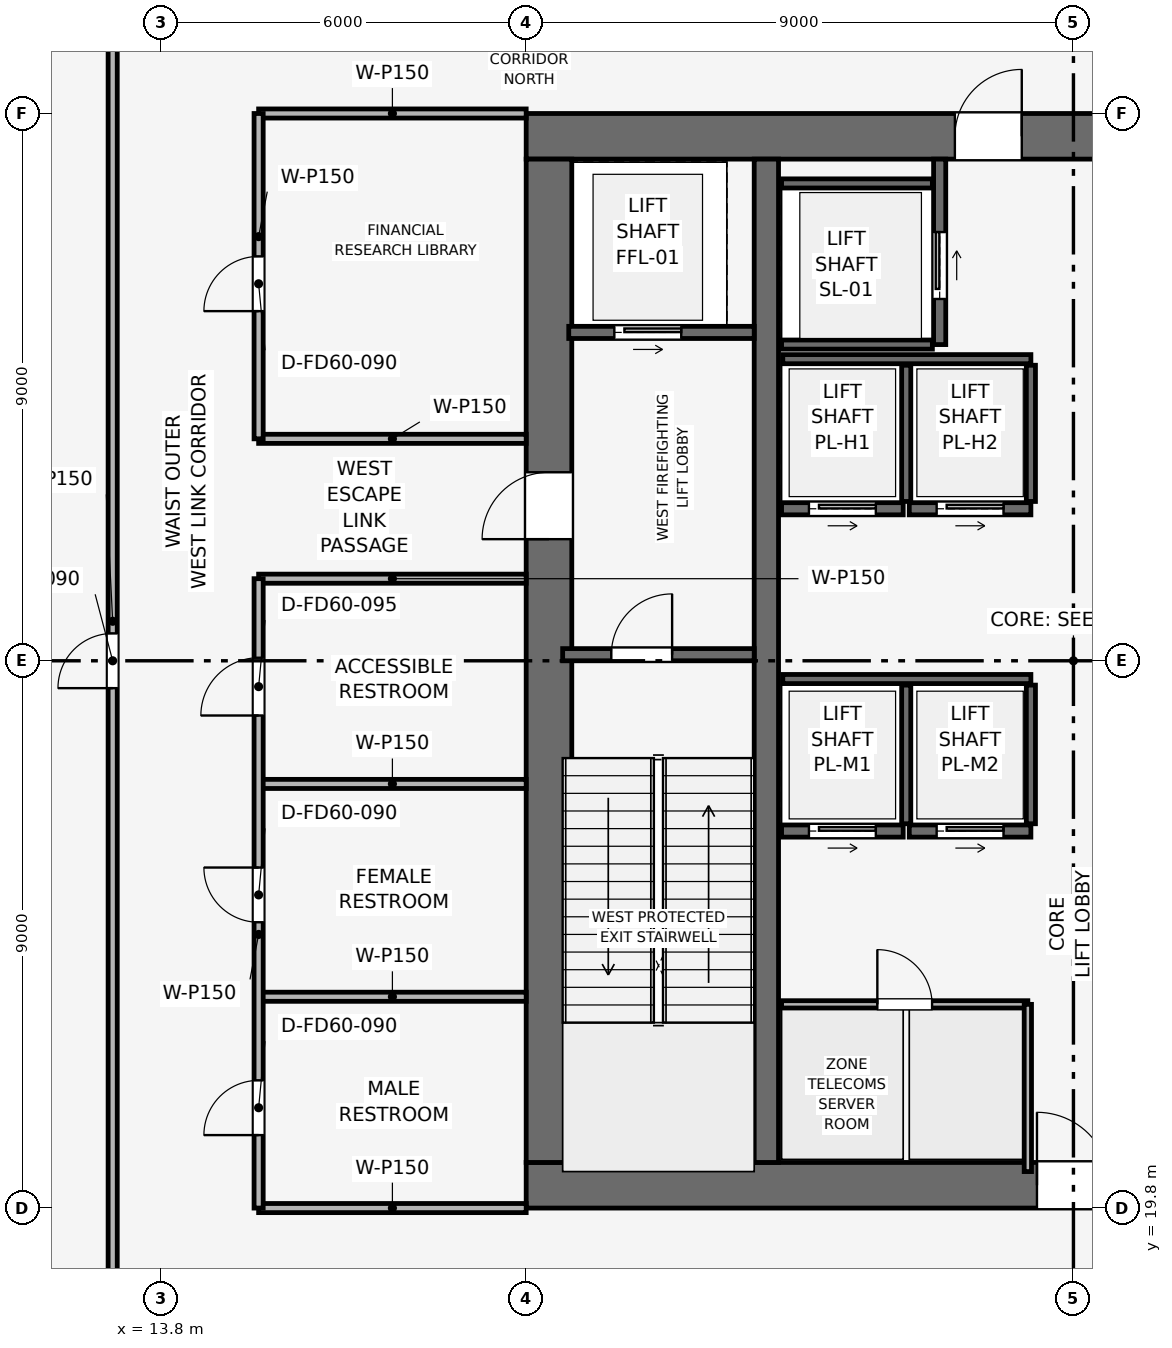
"""IFC4 building model, lengths in metres.
Left out: names, types, materials, properties, quantities, classifications, styles, units other than length and angle.
Written with IfcOpenShell. Run it as: python <this file> out.ifc"""

import sys

from ifc_helpers import new_model, si_unit, direction, frame, frame_2d, origin, place, context, subcontext, project, spatial, rectangle, extrude, element, fill, save


model = new_model("IFC4")
c1 = context("Model", 3, precision=1e-05, world=origin(), true_north=direction((0.0, 1.0)))
c2 = subcontext(c1, "Body", "Model", "MODEL_VIEW")
j1 = project(units=[si_unit("LENGTHUNIT", "METRE"), si_unit("PLANEANGLEUNIT", "RADIAN")], contexts=[c1])
p1 = place(None, origin())
s1 = spatial("IfcSite", under=j1, at=p1, CompositionType="ELEMENT")
p2 = place(p1, origin())
s2 = spatial("IfcBuilding", under=s1, at=p2, CompositionType="ELEMENT")
p3 = place(p2, frame((0.0, 0.0, 241.2)))
s3 = spatial("IfcBuildingStorey", under=s2, at=p3, CompositionType="ELEMENT", Elevation=241.2)
p4 = place(p3, frame((19.8, 20.175, 0.0), z_axis=(0.0, 0.0, 1.0), x_axis=(1.0, 0.0, 0.0)))
e1 = element("IfcWall", 1, at=p4, inside=s3, PredefinedType="SHEAR", context=c2, shape_type="SweptSolid", body=[
    extrude(rectangle(XDim=18.0, YDim=0.75, at=frame_2d((9.0, 0.0))), origin(), (0.0, 0.0, 1.0), 5.4),
])
p5 = place(p4, frame((8.4, 0.0, 0.0)))
e2 = element("IfcOpeningElement", 2, at=p5, cuts=e1, PredefinedType="OPENING", context=c2, shape_type="SweptSolid", body=[
    extrude(rectangle(XDim=1.2, YDim=2.2, at=frame_2d((0.6, 1.1))), frame((0.0, 0.385, 0.0), z_axis=(0.0, -1.0, 0.0), x_axis=(1.0, 0.0, 0.0)), (0.0, 0.0, 1.0), 0.77),
])
p6 = place(p3, frame((19.8, 37.425, 0.0), z_axis=(0.0, 0.0, 1.0), x_axis=(1.0, 0.0, 0.0)))
e3 = element("IfcWall", 3, at=p6, inside=s3, PredefinedType="SHEAR", context=c2, shape_type="SweptSolid", body=[
    extrude(rectangle(XDim=18.0, YDim=0.75, at=frame_2d((9.0, 0.0))), origin(), (0.0, 0.0, 1.0), 5.4),
])
p7 = place(p6, frame((7.05, 0.0, 0.0)))
e4 = element("IfcOpeningElement", 4, at=p7, cuts=e3, PredefinedType="OPENING", context=c2, shape_type="SweptSolid", body=[
    extrude(rectangle(XDim=1.1, YDim=2.15, at=frame_2d((0.55, 1.075))), frame((0.0, 0.385, 0.0), z_axis=(0.0, -1.0, 0.0), x_axis=(1.0, 0.0, 0.0)), (0.0, 0.0, 1.0), 0.77),
])
p8 = place(p3, frame((20.175, 20.55, 0.0), z_axis=(0.0, 0.0, 1.0), x_axis=(0.0, 1.0, 0.0)))
e5 = element("IfcWall", 5, at=p8, inside=s3, PredefinedType="SHEAR", context=c2, shape_type="SweptSolid", body=[
    extrude(rectangle(XDim=16.5, YDim=0.75, at=frame_2d((8.25, 0.0))), origin(), (0.0, 0.0, 1.0), 5.4),
])
p9 = place(p8, frame((10.25, 0.0, 0.0)))
e6 = element("IfcOpeningElement", 6, at=p9, cuts=e5, PredefinedType="OPENING", context=c2, shape_type="SweptSolid", body=[
    extrude(rectangle(XDim=1.1, YDim=2.15, at=frame_2d((0.55, 1.075))), frame((0.0, 0.385, 0.0), z_axis=(0.0, -1.0, 0.0), x_axis=(1.0, 0.0, 0.0)), (0.0, 0.0, 1.0), 0.77),
])
p10 = place(p3, frame((23.75, 20.55, 0.0), z_axis=(0.0, 0.0, 1.0), x_axis=(0.0, 1.0, 0.0)))
e7 = element("IfcWall", 7, at=p10, inside=s3, PredefinedType="SHEAR", context=c2, shape_type="SweptSolid", body=[
    extrude(rectangle(XDim=16.5, YDim=0.4, at=frame_2d((8.25, 0.0))), origin(), (0.0, 0.0, 1.0), 5.4),
])
p11 = place(p3, frame((20.4, 28.9, 0.0), z_axis=(0.0, 0.0, 1.0), x_axis=(1.0, 0.0, 0.0)))
e8 = element("IfcWall", 8, at=p11, inside=s3, PredefinedType="SHEAR", context=c2, shape_type="SweptSolid", body=[
    extrude(rectangle(XDim=3.15, YDim=0.2, at=frame_2d((1.575, 0.0))), origin(), (0.0, 0.0, 1.0), 5.15),
])
p12 = place(p11, frame((0.8, 0.0, 0.0)))
e9 = element("IfcOpeningElement", 9, at=p12, cuts=e8, PredefinedType="OPENING", context=c2, shape_type="SweptSolid", body=[
    extrude(rectangle(XDim=1.0, YDim=2.1, at=frame_2d((0.5, 1.05))), frame((0.0, 0.11, 0.0), z_axis=(0.0, -1.0, 0.0), x_axis=(1.0, 0.0, 0.0)), (0.0, 0.0, 1.0), 0.22),
])
p13 = place(p3, frame((20.5, 34.2, 0.0), z_axis=(0.0, 0.0, 1.0), x_axis=(1.0, 0.0, 0.0)))
e10 = element("IfcWall", 10, at=p13, inside=s3, PredefinedType="SHEAR", context=c2, shape_type="SweptSolid", body=[
    extrude(rectangle(XDim=3.05, YDim=0.2, at=frame_2d((1.525, 0.0))), origin(), (0.0, 0.0, 1.0), 5.15),
])
p14 = place(p13, frame((0.75, 0.0, 0.0)))
e11 = element("IfcOpeningElement", 11, at=p14, cuts=e10, PredefinedType="OPENING", context=c2, shape_type="SweptSolid", body=[
    extrude(rectangle(XDim=1.1, YDim=2.15, at=frame_2d((0.55, 1.075))), frame((0.0, 0.11, 0.0), z_axis=(0.0, -1.0, 0.0), x_axis=(1.0, 0.0, 0.0)), (0.0, 0.0, 1.0), 0.22),
])
p15 = place(p3, frame((26.6, 34.0, 0.0), z_axis=(0.0, 0.0, 1.0), x_axis=(0.0, 1.0, 0.0)))
e12 = element("IfcWall", 12, at=p15, inside=s3, PredefinedType="SHEAR", context=c2, shape_type="SweptSolid", body=[
    extrude(rectangle(XDim=3.05, YDim=0.2, at=frame_2d((1.525, 0.0))), origin(), (0.0, 0.0, 1.0), 5.15),
])
p16 = place(p15, frame((0.75, 0.0, 0.0)))
e13 = element("IfcOpeningElement", 13, at=p16, cuts=e12, PredefinedType="OPENING", context=c2, shape_type="SweptSolid", body=[
    extrude(rectangle(XDim=1.1, YDim=2.15, at=frame_2d((0.55, 1.075))), frame((0.0, 0.11, 0.0), z_axis=(0.0, -1.0, 0.0), x_axis=(1.0, 0.0, 0.0)), (0.0, 0.0, 1.0), 0.22),
])
for number, where, z_axis, x_axis in (
    (14, (24.0, 34.0, 0.0), (0.0, 0.0, 1.0), (1.0, 0.0, 0.0)),
    (15, (24.0, 36.65, 0.0), (0.0, 0.0, 1.0), (1.0, 0.0, 0.0)),
):
    element("IfcWall", number, at=place(p3, frame(where, z_axis=z_axis, x_axis=x_axis)), inside=s3, PredefinedType="SHEAR", context=c2, shape_type="SweptSolid", body=[
        extrude(rectangle(XDim=2.48, YDim=0.15, at=frame_2d((1.24, 0.0))), origin(), (0.0, 0.0, 1.0), 5.15),
    ])
p17 = place(p3, frame((24.0, 26.0, 0.0), z_axis=(0.0, 0.0, 1.0), x_axis=(1.0, 0.0, 0.0)))
e16 = element("IfcWall", 16, at=p17, inside=s3, PredefinedType="SHEAR", context=c2, shape_type="SweptSolid", body=[
    extrude(rectangle(XDim=2.0, YDim=0.2, at=frame_2d((1.0, 0.0))), origin(), (0.0, 0.0, 1.0), 5.15),
])
p18 = place(p17, frame((0.45, 0.0, 0.0)))
e17 = element("IfcOpeningElement", 17, at=p18, cuts=e16, PredefinedType="OPENING", context=c2, shape_type="SweptSolid", body=[
    extrude(rectangle(XDim=1.1, YDim=2.15, at=frame_2d((0.55, 1.075))), frame((0.0, 0.11, 0.0), z_axis=(0.0, -1.0, 0.0), x_axis=(1.0, 0.0, 0.0)), (0.0, 0.0, 1.0), 0.22),
])
p19 = place(p3, frame((26.1, 26.0, 0.0), z_axis=(0.0, 0.0, 1.0), x_axis=(1.0, 0.0, 0.0)))
e18 = element("IfcWall", 18, at=p19, inside=s3, PredefinedType="SHEAR", context=c2, shape_type="SweptSolid", body=[
    extrude(rectangle(XDim=2.0, YDim=0.2, at=frame_2d((1.0, 0.0))), origin(), (0.0, 0.0, 1.0), 5.15),
])
p20 = place(p19, frame((0.45, 0.0, 0.0)))
e19 = element("IfcOpeningElement", 19, at=p20, cuts=e18, PredefinedType="OPENING", context=c2, shape_type="SweptSolid", body=[
    extrude(rectangle(XDim=1.1, YDim=2.15, at=frame_2d((0.55, 1.075))), frame((0.0, 0.11, 0.0), z_axis=(0.0, -1.0, 0.0), x_axis=(1.0, 0.0, 0.0)), (0.0, 0.0, 1.0), 0.22),
])
p21 = place(p3, frame((24.0, 31.3, 0.0), z_axis=(0.0, 0.0, 1.0), x_axis=(1.0, 0.0, 0.0)))
e20 = element("IfcWall", 20, at=p21, inside=s3, PredefinedType="SHEAR", context=c2, shape_type="SweptSolid", body=[
    extrude(rectangle(XDim=2.0, YDim=0.2, at=frame_2d((1.0, 0.0))), origin(), (0.0, 0.0, 1.0), 5.15),
])
p22 = place(p21, frame((0.45, 0.0, 0.0)))
e21 = element("IfcOpeningElement", 21, at=p22, cuts=e20, PredefinedType="OPENING", context=c2, shape_type="SweptSolid", body=[
    extrude(rectangle(XDim=1.1, YDim=2.15, at=frame_2d((0.55, 1.075))), frame((0.0, 0.11, 0.0), z_axis=(0.0, -1.0, 0.0), x_axis=(1.0, 0.0, 0.0)), (0.0, 0.0, 1.0), 0.22),
])
p23 = place(p3, frame((26.1, 31.3, 0.0), z_axis=(0.0, 0.0, 1.0), x_axis=(1.0, 0.0, 0.0)))
e22 = element("IfcWall", 22, at=p23, inside=s3, PredefinedType="SHEAR", context=c2, shape_type="SweptSolid", body=[
    extrude(rectangle(XDim=2.0, YDim=0.2, at=frame_2d((1.0, 0.0))), origin(), (0.0, 0.0, 1.0), 5.15),
])
p24 = place(p23, frame((0.45, 0.0, 0.0)))
e23 = element("IfcOpeningElement", 23, at=p24, cuts=e22, PredefinedType="OPENING", context=c2, shape_type="SweptSolid", body=[
    extrude(rectangle(XDim=1.1, YDim=2.15, at=frame_2d((0.55, 1.075))), frame((0.0, 0.11, 0.0), z_axis=(0.0, -1.0, 0.0), x_axis=(1.0, 0.0, 0.0)), (0.0, 0.0, 1.0), 0.22),
])
p25 = place(p3, frame((24.02, 28.5, 0.0), z_axis=(0.0, 0.0, 1.0), x_axis=(1.0, 0.0, 0.0)))
e24 = element("IfcWall", 24, at=p25, inside=s3, PredefinedType="SHEAR", context=c2, shape_type="SweptSolid", body=[
    extrude(rectangle(XDim=4.08, YDim=0.15, at=frame_2d((2.04, 0.0))), origin(), (0.0, 0.0, 1.0), 5.15),
])
for number, where, z_axis, x_axis in (
    (25, (26.05, 26.12, 0.0), (0.0, 0.0, 1.0), (0.0, 1.0, 0.0)),
    (26, (28.1, 26.12, 0.0), (0.0, 0.0, 1.0), (0.0, 1.0, 0.0)),
):
    element("IfcWall", number, at=place(p3, frame(where, z_axis=z_axis, x_axis=x_axis)), inside=s3, PredefinedType="SHEAR", context=c2, shape_type="SweptSolid", body=[
        extrude(rectangle(XDim=2.28, YDim=0.15, at=frame_2d((1.14, 0.0))), origin(), (0.0, 0.0, 1.0), 5.15),
    ])
p26 = place(p3, frame((24.02, 33.76, 0.0), z_axis=(0.0, 0.0, 1.0), x_axis=(1.0, 0.0, 0.0)))
e27 = element("IfcWall", 27, at=p26, inside=s3, PredefinedType="SHEAR", context=c2, shape_type="SweptSolid", body=[
    extrude(rectangle(XDim=4.08, YDim=0.15, at=frame_2d((2.04, 0.0))), origin(), (0.0, 0.0, 1.0), 5.15),
])
for number, where, z_axis, x_axis in (
    (28, (26.05, 31.42, 0.0), (0.0, 0.0, 1.0), (0.0, 1.0, 0.0)),
    (29, (28.1, 31.42, 0.0), (0.0, 0.0, 1.0), (0.0, 1.0, 0.0)),
):
    element("IfcWall", number, at=place(p3, frame(where, z_axis=z_axis, x_axis=x_axis)), inside=s3, PredefinedType="SHEAR", context=c2, shape_type="SweptSolid", body=[
        extrude(rectangle(XDim=2.24, YDim=0.15, at=frame_2d((1.12, 0.0))), origin(), (0.0, 0.0, 1.0), 5.15),
    ])
p27 = place(p3, frame((24.0, 23.15, 0.0), z_axis=(0.0, 0.0, 1.0), x_axis=(1.0, 0.0, 0.0)))
e30 = element("IfcWall", 30, at=p27, inside=s3, PredefinedType="PARTITIONING", context=c2, shape_type="SweptSolid", body=[
    extrude(rectangle(XDim=4.05, YDim=0.12, at=frame_2d((2.025, 0.0))), origin(), (0.0, 0.0, 1.0), 5.15),
])
p28 = place(p27, frame((1.575, 0.0, 0.0)))
e31 = element("IfcOpeningElement", 31, at=p28, cuts=e30, PredefinedType="OPENING", context=c2, shape_type="SweptSolid", body=[
    extrude(rectangle(XDim=0.9, YDim=2.1, at=frame_2d((0.45, 1.05))), frame((0.0, 0.07, 0.0), z_axis=(0.0, -1.0, 0.0), x_axis=(1.0, 0.0, 0.0)), (0.0, 0.0, 1.0), 0.14),
])
p29 = place(p3, frame((28.05, 20.4, 0.0), z_axis=(0.0, 0.0, 1.0), x_axis=(0.0, 1.0, 0.0)))
e32 = element("IfcWall", 32, at=p29, inside=s3, PredefinedType="PARTITIONING", context=c2, shape_type="SweptSolid", body=[
    extrude(rectangle(XDim=2.75, YDim=0.12, at=frame_2d((1.375, 0.0))), origin(), (0.0, 0.0, 1.0), 5.15),
])
p30 = place(p3, frame((15.4, 19.8, 0.0), z_axis=(0.0, 0.0, 1.0), x_axis=(1.0, 0.0, 0.0)))
e33 = element("IfcWall", 33, at=p30, inside=s3, PredefinedType="PARTITIONING", context=c2, shape_type="SweptSolid", body=[
    extrude(rectangle(XDim=4.4, YDim=0.15, at=frame_2d((2.2, 0.0))), origin(), (0.0, 0.0, 1.0), 4.735),
])
for number, where, z_axis, x_axis in (
    (34, (15.4, 23.275, 0.0), (0.0, 0.0, 1.0), (1.0, 0.0, 0.0)),
    (35, (15.4, 26.775, 0.0), (0.0, 0.0, 1.0), (1.0, 0.0, 0.0)),
    (36, (15.4, 30.15, 0.0), (0.0, 0.0, 1.0), (1.0, 0.0, 0.0)),
    (37, (15.4, 32.45, 0.0), (0.0, 0.0, 1.0), (1.0, 0.0, 0.0)),
):
    element("IfcWall", number, at=place(p3, frame(where, z_axis=z_axis, x_axis=x_axis)), inside=s3, PredefinedType="PARTITIONING", context=c2, shape_type="SweptSolid", body=[
        extrude(rectangle(XDim=4.4, YDim=0.15, at=frame_2d((2.2, 0.0))), origin(), (0.0, 0.0, 1.0), 5.15),
    ])
p31 = place(p3, frame((15.4, 37.8, 0.0), z_axis=(0.0, 0.0, 1.0), x_axis=(1.0, 0.0, 0.0)))
e38 = element("IfcWall", 38, at=p31, inside=s3, PredefinedType="PARTITIONING", context=c2, shape_type="SweptSolid", body=[
    extrude(rectangle(XDim=4.4, YDim=0.15, at=frame_2d((2.2, 0.0))), origin(), (0.0, 0.0, 1.0), 4.735),
])
p32 = place(p3, frame((15.4, 19.8, 0.0), z_axis=(0.0, 0.0, 1.0), x_axis=(0.0, 1.0, 0.0)))
e39 = element("IfcWall", 39, at=p32, inside=s3, PredefinedType="PARTITIONING", context=c2, shape_type="SweptSolid", body=[
    extrude(rectangle(XDim=10.35, YDim=0.15, at=frame_2d((5.175, 0.0))), origin(), (0.0, 0.0, 1.0), 4.735),
])
p33 = place(p32, frame((1.2, 0.0, 0.0)))
e40 = element("IfcOpeningElement", 40, at=p33, cuts=e39, PredefinedType="OPENING", context=c2, shape_type="SweptSolid", body=[
    extrude(rectangle(XDim=0.9, YDim=2.1, at=frame_2d((0.45, 1.05))), frame((0.0, 0.085, 0.0), z_axis=(0.0, -1.0, 0.0), x_axis=(1.0, 0.0, 0.0)), (0.0, 0.0, 1.0), 0.17),
])
p34 = place(p32, frame((4.7, 0.0, 0.0)))
e41 = element("IfcOpeningElement", 41, at=p34, cuts=e39, PredefinedType="OPENING", context=c2, shape_type="SweptSolid", body=[
    extrude(rectangle(XDim=0.9, YDim=2.1, at=frame_2d((0.45, 1.05))), frame((0.0, 0.085, 0.0), z_axis=(0.0, -1.0, 0.0), x_axis=(1.0, 0.0, 0.0)), (0.0, 0.0, 1.0), 0.17),
])
p35 = place(p32, frame((8.1, 0.0, 0.0)))
e42 = element("IfcOpeningElement", 42, at=p35, cuts=e39, PredefinedType="OPENING", context=c2, shape_type="SweptSolid", body=[
    extrude(rectangle(XDim=0.95, YDim=2.1, at=frame_2d((0.475, 1.05))), frame((0.0, 0.085, 0.0), z_axis=(0.0, -1.0, 0.0), x_axis=(1.0, 0.0, 0.0)), (0.0, 0.0, 1.0), 0.17),
])
p36 = place(p3, frame((15.4, 32.45, 0.0), z_axis=(0.0, 0.0, 1.0), x_axis=(0.0, 1.0, 0.0)))
e43 = element("IfcWall", 43, at=p36, inside=s3, PredefinedType="PARTITIONING", context=c2, shape_type="SweptSolid", body=[
    extrude(rectangle(XDim=5.35, YDim=0.15, at=frame_2d((2.675, 0.0))), origin(), (0.0, 0.0, 1.0), 4.735),
])
p37 = place(p36, frame((2.1, 0.0, 0.0)))
e44 = element("IfcOpeningElement", 44, at=p37, cuts=e43, PredefinedType="OPENING", context=c2, shape_type="SweptSolid", body=[
    extrude(rectangle(XDim=0.9, YDim=2.1, at=frame_2d((0.45, 1.05))), frame((0.0, 0.085, 0.0), z_axis=(0.0, -1.0, 0.0), x_axis=(1.0, 0.0, 0.0)), (0.0, 0.0, 1.0), 0.17),
])
p38 = place(p3, frame((13.0, 17.4, 0.0), z_axis=(0.0, 0.0, 1.0), x_axis=(0.0, 1.0, 0.0)))
e45 = element("IfcWall", 45, at=p38, inside=s3, PredefinedType="PARTITIONING", context=c2, shape_type="SweptSolid", body=[
    extrude(rectangle(XDim=22.8, YDim=0.15, at=frame_2d((11.4, 0.0))), origin(), (0.0, 0.0, 1.0), 4.735),
])
p39 = place(p38, frame((10.95, 0.0, 0.0)))
e46 = element("IfcOpeningElement", 46, at=p39, cuts=e45, PredefinedType="OPENING", context=c2, shape_type="SweptSolid", body=[
    extrude(rectangle(XDim=0.9, YDim=2.1, at=frame_2d((0.45, 1.05))), frame((0.0, 0.085, 0.0), z_axis=(0.0, -1.0, 0.0), x_axis=(1.0, 0.0, 0.0)), (0.0, 0.0, 1.0), 0.17),
])
p40 = place(p12, origin())
e47 = element("IfcDoor", 47, at=p40, inside=s3, OperationType="SINGLE_SWING_RIGHT", PredefinedType="DOOR", context=c2, shape_type="SweptSolid", body=[
    extrude(rectangle(XDim=1.0, YDim=2.1, at=frame_2d((0.5, 1.05))), frame((0.0, 0.025, 0.0), z_axis=(0.0, -1.0, 0.0), x_axis=(1.0, 0.0, 0.0)), (0.0, 0.0, 1.0), 0.05),
])
fill(e9, e47)
p41 = place(p14, origin())
e48 = element("IfcDoor", 48, at=p41, inside=s3, OperationType="SLIDING_TO_RIGHT", PredefinedType="DOOR", context=c2, shape_type="SweptSolid", body=[
    extrude(rectangle(XDim=1.1, YDim=2.15, at=frame_2d((0.55, 1.075))), frame((0.0, 0.025, 0.0), z_axis=(0.0, -1.0, 0.0), x_axis=(1.0, 0.0, 0.0)), (0.0, 0.0, 1.0), 0.05),
])
fill(e11, e48)
p42 = place(p16, origin())
e49 = element("IfcDoor", 49, at=p42, inside=s3, OperationType="SLIDING_TO_RIGHT", PredefinedType="DOOR", context=c2, shape_type="SweptSolid", body=[
    extrude(rectangle(XDim=1.1, YDim=2.15, at=frame_2d((0.55, 1.075))), frame((0.0, 0.025, 0.0), z_axis=(0.0, -1.0, 0.0), x_axis=(1.0, 0.0, 0.0)), (0.0, 0.0, 1.0), 0.05),
])
fill(e13, e49)
p43 = place(p18, origin())
e50 = element("IfcDoor", 50, at=p43, inside=s3, OperationType="SLIDING_TO_RIGHT", PredefinedType="DOOR", context=c2, shape_type="SweptSolid", body=[
    extrude(rectangle(XDim=1.1, YDim=2.15, at=frame_2d((0.55, 1.075))), frame((0.0, 0.025, 0.0), z_axis=(0.0, -1.0, 0.0), x_axis=(1.0, 0.0, 0.0)), (0.0, 0.0, 1.0), 0.05),
])
fill(e17, e50)
p44 = place(p20, origin())
e51 = element("IfcDoor", 51, at=p44, inside=s3, OperationType="SLIDING_TO_RIGHT", PredefinedType="DOOR", context=c2, shape_type="SweptSolid", body=[
    extrude(rectangle(XDim=1.1, YDim=2.15, at=frame_2d((0.55, 1.075))), frame((0.0, 0.025, 0.0), z_axis=(0.0, -1.0, 0.0), x_axis=(1.0, 0.0, 0.0)), (0.0, 0.0, 1.0), 0.05),
])
fill(e19, e51)
p45 = place(p22, origin())
e52 = element("IfcDoor", 52, at=p45, inside=s3, OperationType="SLIDING_TO_RIGHT", PredefinedType="DOOR", context=c2, shape_type="SweptSolid", body=[
    extrude(rectangle(XDim=1.1, YDim=2.15, at=frame_2d((0.55, 1.075))), frame((0.0, 0.025, 0.0), z_axis=(0.0, -1.0, 0.0), x_axis=(1.0, 0.0, 0.0)), (0.0, 0.0, 1.0), 0.05),
])
fill(e21, e52)
p46 = place(p24, origin())
e53 = element("IfcDoor", 53, at=p46, inside=s3, OperationType="SLIDING_TO_RIGHT", PredefinedType="DOOR", context=c2, shape_type="SweptSolid", body=[
    extrude(rectangle(XDim=1.1, YDim=2.15, at=frame_2d((0.55, 1.075))), frame((0.0, 0.025, 0.0), z_axis=(0.0, -1.0, 0.0), x_axis=(1.0, 0.0, 0.0)), (0.0, 0.0, 1.0), 0.05),
])
fill(e23, e53)
p47 = place(p28, origin())
e54 = element("IfcDoor", 54, at=p47, inside=s3, OperationType="SINGLE_SWING_LEFT", PredefinedType="DOOR", context=c2, shape_type="SweptSolid", body=[
    extrude(rectangle(XDim=0.9, YDim=2.1, at=frame_2d((0.45, 1.05))), frame((0.0, 0.025, 0.0), z_axis=(0.0, -1.0, 0.0), x_axis=(1.0, 0.0, 0.0)), (0.0, 0.0, 1.0), 0.05),
])
fill(e31, e54)
p48 = place(p33, origin())
e55 = element("IfcDoor", 55, at=p48, inside=s3, OperationType="SINGLE_SWING_LEFT", PredefinedType="DOOR", context=c2, shape_type="SweptSolid", body=[
    extrude(rectangle(XDim=0.9, YDim=2.1, at=frame_2d((0.45, 1.05))), frame((0.0, 0.025, 0.0), z_axis=(0.0, -1.0, 0.0), x_axis=(1.0, 0.0, 0.0)), (0.0, 0.0, 1.0), 0.05),
])
fill(e40, e55)
p49 = place(p34, origin())
e56 = element("IfcDoor", 56, at=p49, inside=s3, OperationType="SINGLE_SWING_RIGHT", PredefinedType="DOOR", context=c2, shape_type="SweptSolid", body=[
    extrude(rectangle(XDim=0.9, YDim=2.1, at=frame_2d((0.45, 1.05))), frame((0.0, 0.025, 0.0), z_axis=(0.0, -1.0, 0.0), x_axis=(1.0, 0.0, 0.0)), (0.0, 0.0, 1.0), 0.05),
])
fill(e41, e56)
p50 = place(p35, origin())
e57 = element("IfcDoor", 57, at=p50, inside=s3, OperationType="SINGLE_SWING_LEFT", PredefinedType="DOOR", context=c2, shape_type="SweptSolid", body=[
    extrude(rectangle(XDim=0.95, YDim=2.1, at=frame_2d((0.475, 1.05))), frame((0.0, 0.025, 0.0), z_axis=(0.0, -1.0, 0.0), x_axis=(1.0, 0.0, 0.0)), (0.0, 0.0, 1.0), 0.05),
])
fill(e42, e57)
p51 = place(p37, origin())
e58 = element("IfcDoor", 58, at=p51, inside=s3, OperationType="SINGLE_SWING_LEFT", PredefinedType="DOOR", context=c2, shape_type="SweptSolid", body=[
    extrude(rectangle(XDim=0.9, YDim=2.1, at=frame_2d((0.45, 1.05))), frame((0.0, 0.025, 0.0), z_axis=(0.0, -1.0, 0.0), x_axis=(1.0, 0.0, 0.0)), (0.0, 0.0, 1.0), 0.05),
])
fill(e44, e58)
p52 = place(p39, origin())
e59 = element("IfcDoor", 59, at=p52, inside=s3, OperationType="SINGLE_SWING_LEFT", PredefinedType="DOOR", context=c2, shape_type="SweptSolid", body=[
    extrude(rectangle(XDim=0.9, YDim=2.1, at=frame_2d((0.45, 1.05))), frame((0.0, 0.025, 0.0), z_axis=(0.0, -1.0, 0.0), x_axis=(1.0, 0.0, 0.0)), (0.0, 0.0, 1.0), 0.05),
])
fill(e46, e59)
p53 = place(p9, origin())
e60 = element("IfcDoor", 60, at=p53, inside=s3, OperationType="SINGLE_SWING_LEFT", PredefinedType="DOOR", context=c2, shape_type="SweptSolid", body=[
    extrude(rectangle(XDim=1.1, YDim=2.15, at=frame_2d((0.55, 1.075))), frame((0.0, 0.025, 0.0), z_axis=(0.0, -1.0, 0.0), x_axis=(1.0, 0.0, 0.0)), (0.0, 0.0, 1.0), 0.05),
])
fill(e6, e60)
p54 = place(p5, origin())
e61 = element("IfcDoor", 61, at=p54, inside=s3, OperationType="SINGLE_SWING_LEFT", PredefinedType="DOOR", context=c2, shape_type="SweptSolid", body=[
    extrude(rectangle(XDim=1.2, YDim=2.2, at=frame_2d((0.6, 1.1))), frame((0.0, 0.025, 0.0), z_axis=(0.0, -1.0, 0.0), x_axis=(1.0, 0.0, 0.0)), (0.0, 0.0, 1.0), 0.05),
])
fill(e2, e61)
p55 = place(p7, origin())
e62 = element("IfcDoor", 62, at=p55, inside=s3, OperationType="SINGLE_SWING_RIGHT", PredefinedType="DOOR", context=c2, shape_type="SweptSolid", body=[
    extrude(rectangle(XDim=1.1, YDim=2.15, at=frame_2d((0.55, 1.075))), frame((0.0, 0.025, 0.0), z_axis=(0.0, -1.0, 0.0), x_axis=(1.0, 0.0, 0.0)), (0.0, 0.0, 1.0), 0.05),
])
fill(e4, e62)
save(model, sys.argv[1])
